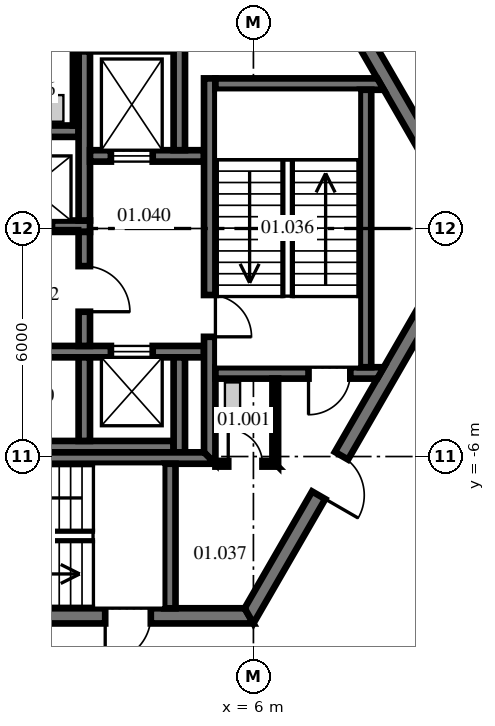
"""IFC4 building model, lengths in metres.
Left out: names, types, materials, properties, quantities, classifications, styles, units other than length and angle.
Written with IfcOpenShell. Run it as: python <this file> out.ifc"""

import sys

from ifc_helpers import new_model, si_unit, direction, frame, frame_2d, origin, place, context, subcontext, project, spatial, polyline, rectangle, outline, extrude, source, transform, mapped, element, fill, save


model = new_model("IFC4")
c1 = context("Model", 3, precision=1e-05, world=origin(), true_north=direction((0.0, 1.0)))
c2 = subcontext(c1, "Body", "Model", "MODEL_VIEW")
j1 = project(units=[si_unit("LENGTHUNIT", "METRE"), si_unit("PLANEANGLEUNIT", "RADIAN")], contexts=[c1])
p1 = place(None, origin())
s1 = spatial("IfcSite", under=j1, at=p1, CompositionType="ELEMENT")
p2 = place(p1, origin())
s2 = spatial("IfcBuilding", under=s1, at=p2, CompositionType="ELEMENT")
p3 = place(p2, frame((0.0, 0.0, 7.0)))
s3 = spatial("IfcBuildingStorey", under=s2, at=p3, CompositionType="ELEMENT", Elevation=7.0)
m1 = source(origin(), c2, "Body", "SweptSolid", [
    extrude(outline(polyline([(-0.115, -0.2), (11.885, -0.2), (11.654, 0.2), (0.115, 0.2), (-0.115, -0.2)])), origin(), (0.0, 0.0, 1.0), 4.3),
])
p4 = place(p3, frame((11.769, 0.0, 0.0), z_axis=(0.0, 0.0, 1.0), x_axis=(-0.499996592174, 0.866027371285, 0.0)))
e1 = element("IfcWall", 1, at=p4, inside=s3, PredefinedType="SHEAR", context=c2, shape_type="MappedRepresentation", body=[
    mapped(m1, transform((0.0, 0.0, 0.0), scale=1.0)),
])
p5 = place(p4, frame((5.75, 0.0, 0.0)))
e2 = element("IfcOpeningElement", 2, at=p5, cuts=e1, PredefinedType="OPENING", context=c2, shape_type="SweptSolid", body=[
    extrude(rectangle(XDim=1.2, YDim=2.1, at=frame_2d((0.6, 1.05))), frame((0.0, 0.21, 0.0), z_axis=(0.0, -1.0, 0.0), x_axis=(1.0, 0.0, 0.0)), (0.0, 0.0, 1.0), 0.42),
])
p6 = place(p3, frame((-5.885, -10.192, 0.0), z_axis=(0.0, 0.0, 1.0), x_axis=(1.0, 0.0, 0.0)))
e3 = element("IfcWall", 3, at=p6, inside=s3, PredefinedType="SHEAR", context=c2, shape_type="MappedRepresentation", body=[
    mapped(m1, transform((0.0, 0.0, 0.0), scale=1.0)),
])
p7 = place(p6, frame((7.985, 0.0, 0.0)))
e4 = element("IfcOpeningElement", 4, at=p7, cuts=e3, PredefinedType="OPENING", context=c2, shape_type="SweptSolid", body=[
    extrude(rectangle(XDim=1.2, YDim=2.1, at=frame_2d((0.6, 1.05))), frame((0.0, 0.21, 0.0), z_axis=(0.0, -1.0, 0.0), x_axis=(1.0, 0.0, 0.0)), (0.0, 0.0, 1.0), 0.42),
])
p8 = place(p3, frame((5.885, -10.192, 0.0), z_axis=(0.0, 0.0, 1.0), x_axis=(0.499996592174, 0.866027371285, 0.0)))
e5 = element("IfcWall", 5, at=p8, inside=s3, PredefinedType="SHEAR", context=c2, shape_type="MappedRepresentation", body=[
    mapped(m1, transform((0.0, 0.0, 0.0), scale=1.0)),
])
p9 = place(p8, frame((3.665, 0.0, 0.0)))
e6 = element("IfcOpeningElement", 6, at=p9, cuts=e5, PredefinedType="OPENING", context=c2, shape_type="SweptSolid", body=[
    extrude(rectangle(XDim=1.2, YDim=2.1, at=frame_2d((0.6, 1.05))), frame((0.0, 0.21, 0.0), z_axis=(0.0, -1.0, 0.0), x_axis=(1.0, 0.0, 0.0)), (0.0, 0.0, 1.0), 0.42),
])
m2 = source(origin(), c2, "Body", "SweptSolid", [
    extrude(rectangle(XDim=11.5, YDim=0.3, at=frame_2d((5.75, 0.0))), origin(), (0.0, 0.0, 1.0), 4.3),
])
p10 = place(p3, frame((-9.8, 0.06, 0.0), z_axis=(0.0, 0.0, 1.0), x_axis=(1.0, 0.0, 0.0)))
e7 = element("IfcWall", 7, at=p10, inside=s3, PredefinedType="SHEAR", context=c2, shape_type="MappedRepresentation", body=[
    mapped(m2, transform((0.0, 0.0, 0.0), scale=1.0)),
])
p11 = place(p10, frame((1.0, 0.0, 0.0)))
e8 = element("IfcOpeningElement", 8, at=p11, cuts=e7, PredefinedType="OPENING", context=c2, shape_type="SweptSolid", body=[
    extrude(rectangle(XDim=1.1, YDim=2.1, at=frame_2d((0.55, 1.05))), frame((0.0, 0.16, 0.0), z_axis=(0.0, -1.0, 0.0), x_axis=(1.0, 0.0, 0.0)), (0.0, 0.0, 1.0), 0.32),
])
p12 = place(p10, frame((3.8, 0.0, 0.0)))
e9 = element("IfcOpeningElement", 9, at=p12, cuts=e7, PredefinedType="OPENING", context=c2, shape_type="SweptSolid", body=[
    extrude(rectangle(XDim=1.1, YDim=2.1, at=frame_2d((0.55, 1.05))), frame((0.0, 0.16, 0.0), z_axis=(0.0, -1.0, 0.0), x_axis=(1.0, 0.0, 0.0)), (0.0, 0.0, 1.0), 0.32),
])
p13 = place(p10, frame((6.6, 0.0, 0.0)))
e10 = element("IfcOpeningElement", 10, at=p13, cuts=e7, PredefinedType="OPENING", context=c2, shape_type="SweptSolid", body=[
    extrude(rectangle(XDim=1.1, YDim=2.1, at=frame_2d((0.55, 1.05))), frame((0.0, 0.16, 0.0), z_axis=(0.0, -1.0, 0.0), x_axis=(1.0, 0.0, 0.0)), (0.0, 0.0, 1.0), 0.32),
])
p14 = place(p10, frame((9.4, 0.0, 0.0)))
e11 = element("IfcOpeningElement", 11, at=p14, cuts=e7, PredefinedType="OPENING", context=c2, shape_type="SweptSolid", body=[
    extrude(rectangle(XDim=1.1, YDim=2.1, at=frame_2d((0.55, 1.05))), frame((0.0, 0.16, 0.0), z_axis=(0.0, -1.0, 0.0), x_axis=(1.0, 0.0, 0.0)), (0.0, 0.0, 1.0), 0.32),
])
m3 = source(origin(), c2, "Body", "SweptSolid", [
    extrude(outline(polyline([(11.2, -0.15), (-0.349, -0.15), (-0.176, 0.15), (11.2, 0.15), (11.2, -0.15)])), origin(), (0.0, 0.0, 1.0), 4.3),
])
p15 = place(p3, frame((-9.8, 2.56, 0.0), z_axis=(0.0, 0.0, 1.0), x_axis=(1.0, 0.0, 0.0)))
e12 = element("IfcWall", 12, at=p15, inside=s3, PredefinedType="SHEAR", context=c2, shape_type="MappedRepresentation", body=[
    mapped(m3, transform((0.0, 0.0, 0.0), scale=1.0)),
])
m4 = source(origin(), c2, "Body", "SweptSolid", [
    extrude(rectangle(XDim=4.45, YDim=0.3, at=frame_2d((2.225, 0.0))), origin(), (0.0, 0.0, 1.0), 4.3),
])
p16 = place(p3, frame((1.55, 0.21, 0.0), z_axis=(0.0, 0.0, 1.0), x_axis=(0.0, 1.0, 0.0)))
e13 = element("IfcWall", 13, at=p16, inside=s3, PredefinedType="SHEAR", context=c2, shape_type="MappedRepresentation", body=[
    mapped(m4, transform((0.0, 0.0, 0.0), scale=1.0)),
])
m5 = source(origin(), c2, "Body", "SweptSolid", [
    extrude(rectangle(XDim=3.0, YDim=0.3, at=frame_2d((1.5, 0.0))), origin(), (0.0, 0.0, 1.0), 4.3),
])
p17 = place(p3, frame((1.7, 1.91, 0.0), z_axis=(0.0, 0.0, 1.0), x_axis=(1.0, 0.0, 0.0)))
e14 = element("IfcWall", 14, at=p17, inside=s3, PredefinedType="SHEAR", context=c2, shape_type="MappedRepresentation", body=[
    mapped(m5, transform((0.0, 0.0, 0.0), scale=1.0)),
])
p18 = place(p17, frame((0.55, 0.0, 0.0)))
e15 = element("IfcOpeningElement", 15, at=p18, cuts=e14, PredefinedType="OPENING", context=c2, shape_type="SweptSolid", body=[
    extrude(rectangle(XDim=1.1, YDim=2.1, at=frame_2d((0.55, 1.05))), frame((0.0, 0.16, 0.0), z_axis=(0.0, -1.0, 0.0), x_axis=(1.0, 0.0, 0.0)), (0.0, 0.0, 1.0), 0.32),
])
m6 = source(origin(), c2, "Body", "SweptSolid", [
    extrude(rectangle(XDim=2.9, YDim=0.3, at=frame_2d((1.45, 0.0))), origin(), (0.0, 0.0, 1.0), 4.3),
])
p19 = place(p3, frame((4.05, 2.06, 0.0), z_axis=(0.0, 0.0, 1.0), x_axis=(0.0, 1.0, 0.0)))
e16 = element("IfcWall", 16, at=p19, inside=s3, PredefinedType="SHEAR", context=c2, shape_type="MappedRepresentation", body=[
    mapped(m6, transform((0.0, 0.0, 0.0), scale=1.0)),
])
m7 = source(origin(), c2, "Body", "SweptSolid", [
    extrude(rectangle(XDim=12.8, YDim=0.3, at=frame_2d((6.4, 0.0))), origin(), (0.0, 0.0, 1.0), 4.3),
])
p20 = place(p3, frame((-8.1, -3.24, 0.0), z_axis=(0.0, 0.0, 1.0), x_axis=(1.0, 0.0, 0.0)))
e17 = element("IfcWall", 17, at=p20, inside=s3, PredefinedType="SHEAR", context=c2, shape_type="MappedRepresentation", body=[
    mapped(m7, transform((0.0, 0.0, 0.0), scale=1.0)),
])
p21 = place(p20, frame((1.613, 0.0, 0.0)))
e18 = element("IfcOpeningElement", 18, at=p21, cuts=e17, PredefinedType="OPENING", context=c2, shape_type="SweptSolid", body=[
    extrude(rectangle(XDim=0.9, YDim=2.1, at=frame_2d((0.45, 1.05))), frame((0.0, 0.16, 0.0), z_axis=(0.0, -1.0, 0.0), x_axis=(1.0, 0.0, 0.0)), (0.0, 0.0, 1.0), 0.32),
])
p22 = place(p20, frame((4.45, 0.0, 0.0)))
e19 = element("IfcOpeningElement", 19, at=p22, cuts=e17, PredefinedType="OPENING", context=c2, shape_type="SweptSolid", body=[
    extrude(rectangle(XDim=0.9, YDim=2.1, at=frame_2d((0.45, 1.05))), frame((0.0, 0.16, 0.0), z_axis=(0.0, -1.0, 0.0), x_axis=(1.0, 0.0, 0.0)), (0.0, 0.0, 1.0), 0.32),
])
p23 = place(p20, frame((7.288, 0.0, 0.0)))
e20 = element("IfcOpeningElement", 20, at=p23, cuts=e17, PredefinedType="OPENING", context=c2, shape_type="SweptSolid", body=[
    extrude(rectangle(XDim=0.9, YDim=2.1, at=frame_2d((0.45, 1.05))), frame((0.0, 0.16, 0.0), z_axis=(0.0, -1.0, 0.0), x_axis=(1.0, 0.0, 0.0)), (0.0, 0.0, 1.0), 0.32),
])
p24 = place(p20, frame((10.35, 0.0, 0.0)))
e21 = element("IfcOpeningElement", 21, at=p24, cuts=e17, PredefinedType="OPENING", context=c2, shape_type="SweptSolid", body=[
    extrude(rectangle(XDim=1.1, YDim=2.1, at=frame_2d((0.55, 1.05))), frame((0.0, 0.16, 0.0), z_axis=(0.0, -1.0, 0.0), x_axis=(1.0, 0.0, 0.0)), (0.0, 0.0, 1.0), 0.32),
])
m8 = source(origin(), c2, "Body", "SweptSolid", [
    extrude(outline(polyline([(12.0, -0.15), (-0.04, -0.15), (-0.213, 0.15), (12.0, 0.15), (12.0, -0.15)])), origin(), (0.0, 0.0, 1.0), 4.3),
])
p25 = place(p3, frame((-8.1, -5.74, 0.0), z_axis=(0.0, 0.0, 1.0), x_axis=(1.0, 0.0, 0.0)))
e22 = element("IfcWall", 22, at=p25, inside=s3, PredefinedType="SHEAR", context=c2, shape_type="MappedRepresentation", body=[
    mapped(m8, transform((0.0, 0.0, 0.0), scale=1.0)),
])
m9 = source(origin(), c2, "Body", "SweptSolid", [
    extrude(rectangle(XDim=2.2, YDim=0.3, at=frame_2d((1.1, 0.0))), origin(), (0.0, 0.0, 1.0), 4.3),
])
p26 = place(p3, frame((1.55, -5.59, 0.0), z_axis=(0.0, 0.0, 1.0), x_axis=(0.0, 1.0, 0.0)))
e23 = element("IfcWall", 23, at=p26, inside=s3, PredefinedType="SHEAR", context=c2, shape_type="MappedRepresentation", body=[
    mapped(m9, transform((0.0, 0.0, 0.0), scale=1.0)),
])
m10 = source(origin(), c2, "Body", "SweptSolid", [
    extrude(rectangle(XDim=2.5, YDim=0.3, at=frame_2d((1.25, 0.0))), origin(), (0.0, 0.0, 1.0), 4.3),
])
p27 = place(p3, frame((4.05, -5.89, 0.0), z_axis=(0.0, 0.0, 1.0), x_axis=(0.0, 1.0, 0.0)))
e24 = element("IfcWall", 24, at=p27, inside=s3, PredefinedType="SHEAR", context=c2, shape_type="MappedRepresentation", body=[
    mapped(m10, transform((0.0, 0.0, 0.0), scale=1.0)),
])
p28 = place(p3, frame((1.55, -3.09, 0.0), z_axis=(0.0, 0.0, 1.0), x_axis=(0.0, 1.0, 0.0)))
e25 = element("IfcWall", 25, at=p28, inside=s3, PredefinedType="SHEAR", context=c2, shape_type="MappedRepresentation", body=[
    mapped(m5, transform((0.0, 0.0, 0.0), scale=1.0)),
])
p29 = place(p28, frame((0.9, 0.0, 0.0)))
e26 = element("IfcOpeningElement", 26, at=p29, cuts=e25, PredefinedType="OPENING", context=c2, shape_type="SweptSolid", body=[
    extrude(rectangle(XDim=1.2, YDim=2.1, at=frame_2d((0.6, 1.05))), frame((0.0, 0.16, 0.0), z_axis=(0.0, -1.0, 0.0), x_axis=(1.0, 0.0, 0.0)), (0.0, 0.0, 1.0), 0.32),
])
m11 = source(origin(), c2, "Body", "SweptSolid", [
    extrude(outline(polyline([(-0.15, -0.15), (9.99, -0.15), (9.99, 0.15), (0.15, 0.15), (-0.15, -0.15)])), origin(), (0.0, 0.0, 1.0), 4.3),
])
p30 = place(p3, frame((4.85, -6.04, 0.0), z_axis=(0.0, 0.0, 1.0), x_axis=(0.0, 1.0, 0.0)))
e27 = element("IfcWall", 27, at=p30, inside=s3, PredefinedType="SHEAR", context=c2, shape_type="MappedRepresentation", body=[
    mapped(m11, transform((0.0, 0.0, 0.0), scale=1.0)),
])
p31 = place(p30, frame((3.19, 0.0, 0.0)))
e28 = element("IfcOpeningElement", 28, at=p31, cuts=e27, PredefinedType="OPENING", context=c2, shape_type="SweptSolid", body=[
    extrude(rectangle(XDim=1.1, YDim=2.1, at=frame_2d((0.55, 1.05))), frame((0.0, 0.16, 0.0), z_axis=(0.0, -1.0, 0.0), x_axis=(1.0, 0.0, 0.0)), (0.0, 0.0, 1.0), 0.32),
])
m12 = source(origin(), c2, "Body", "SweptSolid", [
    extrude(outline(polyline([(0.0, -0.15), (0.0, 0.15), (4.26, 0.15), (4.433, -0.15), (0.0, -0.15)])), origin(), (0.0, 0.0, 1.0), 4.3),
])
p32 = place(p3, frame((5.0, 3.8, 0.0), z_axis=(0.0, 0.0, 1.0), x_axis=(1.0, 0.0, 0.0)))
e29 = element("IfcWall", 29, at=p32, inside=s3, PredefinedType="SHEAR", context=c2, shape_type="MappedRepresentation", body=[
    mapped(m12, transform((0.0, 0.0, 0.0), scale=1.0)),
])
m13 = source(origin(), c2, "Body", "SweptSolid", [
    extrude(outline(polyline([(0.0, -0.15), (0.0, 0.15), (4.433, 0.15), (4.26, -0.15), (0.0, -0.15)])), origin(), (0.0, 0.0, 1.0), 4.3),
])
p33 = place(p3, frame((5.0, -3.8, 0.0), z_axis=(0.0, 0.0, 1.0), x_axis=(1.0, 0.0, 0.0)))
e30 = element("IfcWall", 30, at=p33, inside=s3, PredefinedType="SHEAR", context=c2, shape_type="MappedRepresentation", body=[
    mapped(m13, transform((0.0, 0.0, 0.0), scale=1.0)),
])
p34 = place(p33, frame((2.45, 0.0, 0.0)))
e31 = element("IfcOpeningElement", 31, at=p34, cuts=e30, PredefinedType="OPENING", context=c2, shape_type="SweptSolid", body=[
    extrude(rectangle(XDim=1.1, YDim=2.1, at=frame_2d((0.55, 1.05))), frame((0.0, 0.16, 0.0), z_axis=(0.0, -1.0, 0.0), x_axis=(1.0, 0.0, 0.0)), (0.0, 0.0, 1.0), 0.32),
])
m14 = source(origin(), c2, "Body", "SweptSolid", [
    extrude(rectangle(XDim=7.3, YDim=0.3, at=frame_2d((3.65, 0.0))), origin(), (0.0, 0.0, 1.0), 4.3),
])
p35 = place(p3, frame((8.95, -3.65, 0.0), z_axis=(0.0, 0.0, 1.0), x_axis=(0.0, 1.0, 0.0)))
e32 = element("IfcWall", 32, at=p35, inside=s3, PredefinedType="SHEAR", context=c2, shape_type="MappedRepresentation", body=[
    mapped(m14, transform((0.0, 0.0, 0.0), scale=1.0)),
])
m15 = source(origin(), c2, "Body", "SweptSolid", [
    extrude(outline(polyline([(0.0, -0.15), (8.95, -0.15), (8.65, 0.15), (0.0, 0.15), (0.0, -0.15)])), origin(), (0.0, 0.0, 1.0), 4.3),
])
p36 = place(p3, frame((-3.95, -6.04, 0.0), z_axis=(0.0, 0.0, 1.0), x_axis=(1.0, 0.0, 0.0)))
e33 = element("IfcWall", 33, at=p36, inside=s3, PredefinedType="SHEAR", context=c2, shape_type="MappedRepresentation", body=[
    mapped(m15, transform((0.0, 0.0, 0.0), scale=1.0)),
])
m16 = source(origin(), c2, "Body", "SweptSolid", [
    extrude(outline(polyline([(3.8, -0.15), (-0.004, -0.15), (-0.004, 0.15), (3.8, 0.15), (3.8, -0.15)])), origin(), (0.0, 0.0, 1.0), 4.3),
])
p37 = place(p3, frame((3.8, -9.99, 0.0), z_axis=(0.0, 0.0, 1.0), x_axis=(0.0, 1.0, 0.0)))
e34 = element("IfcWall", 34, at=p37, inside=s3, PredefinedType="SHEAR", context=c2, shape_type="MappedRepresentation", body=[
    mapped(m16, transform((0.0, 0.0, 0.0), scale=1.0)),
])
m17 = source(origin(), c2, "Body", "SweptSolid", [
    extrude(rectangle(XDim=3.18, YDim=0.15, at=frame_2d((1.59, 0.0))), origin(), (0.0, 0.0, 1.0), 4.3),
])
p38 = place(p3, frame((1.325, 2.71, 0.0), z_axis=(0.0, 0.0, 1.0), x_axis=(0.0, 1.0, 0.0)))
e35 = element("IfcWall", 35, at=p38, inside=s3, PredefinedType="PARTITIONING", context=c2, shape_type="MappedRepresentation", body=[
    mapped(m17, transform((0.0, 0.0, 0.0), scale=1.0)),
])
p39 = place(p38, frame((2.265, 0.0, 0.0)))
e36 = element("IfcOpeningElement", 36, at=p39, cuts=e35, PredefinedType="OPENING", context=c2, shape_type="SweptSolid", body=[
    extrude(rectangle(XDim=0.9, YDim=2.1, at=frame_2d((0.45, 1.05))), frame((0.0, 0.085, 0.0), z_axis=(0.0, -1.0, 0.0), x_axis=(1.0, 0.0, 0.0)), (0.0, 0.0, 1.0), 0.17),
])
m18 = source(origin(), c2, "Body", "SweptSolid", [
    extrude(outline(polyline([(0.0, -0.075), (1.65, -0.075), (1.5, 0.075), (0.0, 0.075), (0.0, -0.075)])), origin(), (0.0, 0.0, 1.0), 4.3),
])
p40 = place(p3, frame((5.0, -6.19, 0.0), z_axis=(0.0, 0.0, 1.0), x_axis=(1.0, 0.0, 0.0)))
e37 = element("IfcWall", 37, at=p40, inside=s3, PredefinedType="PARTITIONING", context=c2, shape_type="MappedRepresentation", body=[
    mapped(m18, transform((0.0, 0.0, 0.0), scale=1.0)),
])
p41 = place(p40, frame((0.337, 0.0, 0.0)))
e38 = element("IfcOpeningElement", 38, at=p41, cuts=e37, PredefinedType="OPENING", context=c2, shape_type="SweptSolid", body=[
    extrude(rectangle(XDim=0.9, YDim=2.1, at=frame_2d((0.45, 1.05))), frame((0.0, 0.085, 0.0), z_axis=(0.0, -1.0, 0.0), x_axis=(1.0, 0.0, 0.0)), (0.0, 0.0, 1.0), 0.17),
])
m19 = source(origin(), c2, "Body", "SweptSolid", [
    extrude(outline(polyline([(-0.075, -0.075), (2.24, -0.075), (2.24, 0.075), (0.075, 0.075), (-0.075, -0.075)])), origin(), (0.0, 0.0, 1.0), 4.3),
])
p42 = place(p3, frame((6.575, -6.19, 0.0), z_axis=(0.0, 0.0, 1.0), x_axis=(0.0, 1.0, 0.0)))
e39 = element("IfcWall", 39, at=p42, inside=s3, PredefinedType="PARTITIONING", context=c2, shape_type="MappedRepresentation", body=[
    mapped(m19, transform((0.0, 0.0, 0.0), scale=1.0)),
])
p43 = place(p3, frame((8.792, 15.156, 0.0), z_axis=(0.0, 0.0, 1.0), x_axis=(0.499996830835, -0.866027233495, 0.0)))
e40 = element("IfcWall", 40, at=p43, inside=s3, PredefinedType="PARTITIONING", context=c2, shape_type="SweptSolid", body=[
    extrude(rectangle(XDim=17.458, YDim=0.15, at=frame_2d((8.729, 0.0))), origin(), (0.0, 0.0, 1.0), 4.3),
])
p44 = place(p43, frame((11.551, 0.0, 0.0)))
e41 = element("IfcOpeningElement", 41, at=p44, cuts=e40, PredefinedType="OPENING", context=c2, shape_type="SweptSolid", body=[
    extrude(rectangle(XDim=2.4, YDim=2.4, at=frame_2d((1.2, 1.2))), frame((0.0, 0.085, 0.0), z_axis=(0.0, -1.0, 0.0), x_axis=(1.0, 0.0, 0.0)), (0.0, 0.0, 1.0), 0.17),
])
p45 = place(p43, frame((2.014, 0.0, 0.0)))
e42 = element("IfcOpeningElement", 42, at=p45, cuts=e40, PredefinedType="OPENING", context=c2, shape_type="SweptSolid", body=[
    extrude(rectangle(XDim=0.9, YDim=2.1, at=frame_2d((0.45, 1.05))), frame((0.0, 0.085, 0.0), z_axis=(0.0, -1.0, 0.0), x_axis=(1.0, 0.0, 0.0)), (0.0, 0.0, 1.0), 0.17),
])
p46 = place(p43, frame((6.117, 0.0, 0.0)))
e43 = element("IfcOpeningElement", 43, at=p46, cuts=e40, PredefinedType="OPENING", context=c2, shape_type="SweptSolid", body=[
    extrude(rectangle(XDim=0.9, YDim=2.1, at=frame_2d((0.45, 1.05))), frame((0.0, 0.085, 0.0), z_axis=(0.0, -1.0, 0.0), x_axis=(1.0, 0.0, 0.0)), (0.0, 0.0, 1.0), 0.17),
])
p47 = place(p3, frame((8.772, -15.191, 0.0), z_axis=(0.0, 0.0, 1.0), x_axis=(0.499997184852, 0.866027029105, 0.0)))
e44 = element("IfcWall", 44, at=p47, inside=s3, PredefinedType="PARTITIONING", context=c2, shape_type="SweptSolid", body=[
    extrude(rectangle(XDim=17.539, YDim=0.15, at=frame_2d((8.769, 0.0))), origin(), (0.0, 0.0, 1.0), 4.3),
])
p48 = place(p47, frame((11.657, 0.0, 0.0)))
e45 = element("IfcOpeningElement", 45, at=p48, cuts=e44, PredefinedType="OPENING", context=c2, shape_type="SweptSolid", body=[
    extrude(rectangle(XDim=2.4, YDim=2.4, at=frame_2d((1.2, 1.2))), frame((0.0, 0.085, 0.0), z_axis=(0.0, -1.0, 0.0), x_axis=(1.0, 0.0, 0.0)), (0.0, 0.0, 1.0), 0.17),
])
p49 = place(p7, frame((1.2, 0.0, 0.0), z_axis=(0.0, 0.0, 1.0), x_axis=(-1.0, 0.0, 0.0)))
e46 = element("IfcDoor", 46, at=p49, inside=s3, OperationType="SINGLE_SWING_RIGHT", PredefinedType="DOOR", context=c2, shape_type="SweptSolid", body=[
    extrude(rectangle(XDim=1.2, YDim=2.1, at=frame_2d((0.6, 1.05))), frame((0.0, 0.025, 0.0), z_axis=(0.0, -1.0, 0.0), x_axis=(1.0, 0.0, 0.0)), (0.0, 0.0, 1.0), 0.05),
])
fill(e4, e46)
p50 = place(p9, frame((1.2, 0.0, 0.0), z_axis=(0.0, 0.0, 1.0), x_axis=(-1.0, 0.0, 0.0)))
e47 = element("IfcDoor", 47, at=p50, inside=s3, OperationType="SINGLE_SWING_RIGHT", PredefinedType="DOOR", context=c2, shape_type="SweptSolid", body=[
    extrude(rectangle(XDim=1.2, YDim=2.1, at=frame_2d((0.6, 1.05))), frame((0.0, 0.025, 0.0), z_axis=(0.0, -1.0, 0.0), x_axis=(1.0, 0.0, 0.0)), (0.0, 0.0, 1.0), 0.05),
])
fill(e6, e47)
p51 = place(p31, frame((1.1, 0.0, 0.0), z_axis=(0.0, 0.0, 1.0), x_axis=(-1.0, 0.0, 0.0)))
e48 = element("IfcDoor", 48, at=p51, inside=s3, OperationType="SINGLE_SWING_RIGHT", PredefinedType="DOOR", context=c2, shape_type="SweptSolid", body=[
    extrude(rectangle(XDim=1.1, YDim=2.1, at=frame_2d((0.55, 1.05))), frame((0.0, 0.025, 0.0), z_axis=(0.0, -1.0, 0.0), x_axis=(1.0, 0.0, 0.0)), (0.0, 0.0, 1.0), 0.05),
])
fill(e28, e48)
p52 = place(p34, frame((1.1, 0.0, 0.0), z_axis=(0.0, 0.0, 1.0), x_axis=(-1.0, 0.0, 0.0)))
e49 = element("IfcDoor", 49, at=p52, inside=s3, OperationType="SINGLE_SWING_RIGHT", PredefinedType="DOOR", context=c2, shape_type="SweptSolid", body=[
    extrude(rectangle(XDim=1.1, YDim=2.1, at=frame_2d((0.55, 1.05))), frame((0.0, 0.025, 0.0), z_axis=(0.0, -1.0, 0.0), x_axis=(1.0, 0.0, 0.0)), (0.0, 0.0, 1.0), 0.05),
])
fill(e31, e49)
p53 = place(p29, frame((1.2, 0.0, 0.0), z_axis=(0.0, 0.0, 1.0), x_axis=(-1.0, 0.0, 0.0)))
e50 = element("IfcDoor", 50, at=p53, inside=s3, OperationType="SINGLE_SWING_RIGHT", PredefinedType="DOOR", context=c2, shape_type="SweptSolid", body=[
    extrude(rectangle(XDim=1.2, YDim=2.1, at=frame_2d((0.6, 1.05))), frame((0.0, 0.025, 0.0), z_axis=(0.0, -1.0, 0.0), x_axis=(1.0, 0.0, 0.0)), (0.0, 0.0, 1.0), 0.05),
])
fill(e26, e50)
p54 = place(p41, origin())
e51 = element("IfcDoor", 51, at=p54, inside=s3, OperationType="SINGLE_SWING_LEFT", PredefinedType="DOOR", context=c2, shape_type="SweptSolid", body=[
    extrude(rectangle(XDim=0.9, YDim=2.1, at=frame_2d((0.45, 1.05))), frame((0.0, 0.025, 0.0), z_axis=(0.0, -1.0, 0.0), x_axis=(1.0, 0.0, 0.0)), (0.0, 0.0, 1.0), 0.05),
])
fill(e38, e51)
p55 = place(p18, origin())
e52 = element("IfcDoor", 52, at=p55, inside=s3, OperationType="DOUBLE_DOOR_SLIDING", PredefinedType="DOOR", context=c2, shape_type="SweptSolid", body=[
    extrude(rectangle(XDim=1.1, YDim=2.1, at=frame_2d((0.55, 1.05))), frame((0.0, 0.025, 0.0), z_axis=(0.0, -1.0, 0.0), x_axis=(1.0, 0.0, 0.0)), (0.0, 0.0, 1.0), 0.05),
])
fill(e15, e52)
p56 = place(p24, origin())
e53 = element("IfcDoor", 53, at=p56, inside=s3, OperationType="DOUBLE_DOOR_SLIDING", PredefinedType="DOOR", context=c2, shape_type="SweptSolid", body=[
    extrude(rectangle(XDim=1.1, YDim=2.1, at=frame_2d((0.55, 1.05))), frame((0.0, 0.025, 0.0), z_axis=(0.0, -1.0, 0.0), x_axis=(1.0, 0.0, 0.0)), (0.0, 0.0, 1.0), 0.05),
])
fill(e21, e53)
save(model, sys.argv[1])
